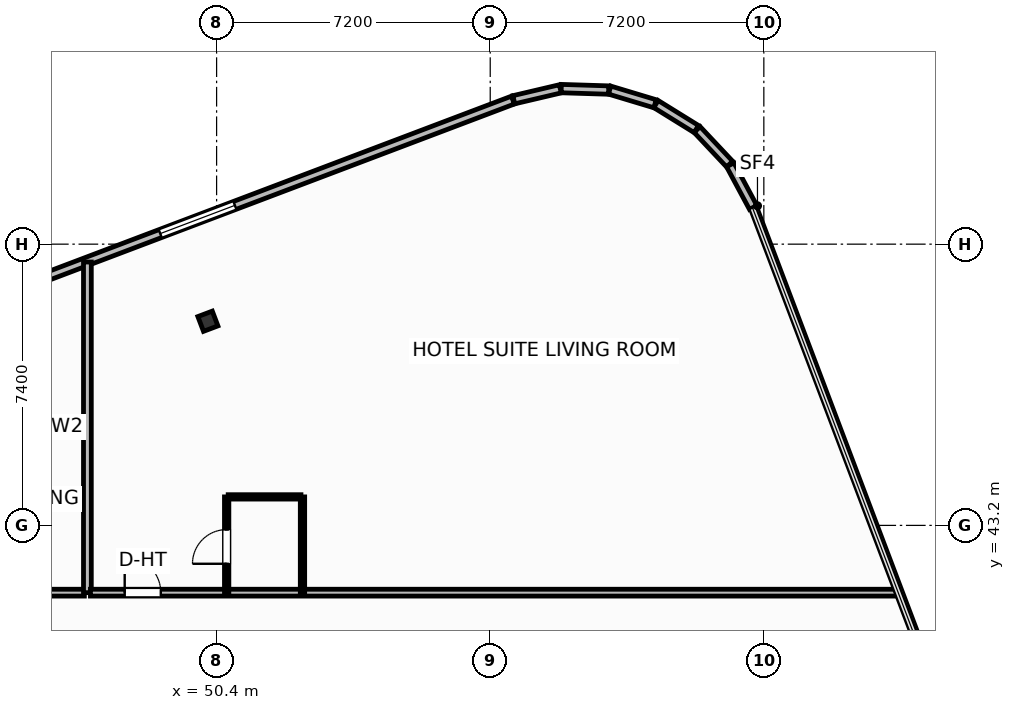
"""IFC4 building model, lengths in metres.
Left out: names, types, materials, properties, quantities, classifications, styles, units other than length and angle.
Written with IfcOpenShell. Run it as: python <this file> out.ifc"""

import sys

from ifc_helpers import new_model, si_unit, direction, frame, frame_2d, origin, origin_2d, place, context, subcontext, project, spatial, rectangle, i_section, extrude, element, fill, save


model = new_model("IFC4")
c1 = context("Model", 3, precision=1e-05, world=origin(), true_north=direction((0.0, 1.0)))
c2 = subcontext(c1, "Body", "Model", "MODEL_VIEW")
j1 = project(units=[si_unit("LENGTHUNIT", "METRE"), si_unit("PLANEANGLEUNIT", "RADIAN")], contexts=[c1])
p1 = place(None, origin())
s1 = spatial("IfcSite", under=j1, at=p1, CompositionType="ELEMENT")
p2 = place(p1, origin())
s2 = spatial("IfcBuilding", under=s1, at=p2, CompositionType="ELEMENT")
p3 = place(p2, frame((0.0, 0.0, 212.7)))
s3 = spatial("IfcBuildingStorey", under=s2, at=p3, CompositionType="ELEMENT", Elevation=212.7)
p4 = place(p3, frame((50.171, 48.572, 0.0), z_axis=(0.0, 0.0, 1.0), x_axis=(0.935221751401, 0.354062530786, 0.0)))
e1 = element("IfcColumn", 1, at=p4, inside=s3, PredefinedType="COLUMN", context=c2, shape_type="SweptSolid", body=[
    extrude(i_section(OverallWidth=0.406, OverallDepth=0.416, WebThickness=0.03, FlangeThickness=0.048, FilletRadius=0.025, at=origin_2d()), origin(), (0.0, 0.0, 1.0), 3.7),
])
p5 = place(p3, frame((64.519, 51.566, 0.0), z_axis=(0.0, 0.0, 1.0), x_axis=(-0.473093575122, 0.881012184466, 0.0)))
e2 = element("IfcWall", 2, at=p5, inside=s3, PredefinedType="SOLIDWALL", context=c2, shape_type="SweptSolid", body=[
    extrude(rectangle(XDim=1.274, YDim=0.22, at=frame_2d((0.637, 0.0))), origin(), (0.0, 0.0, 1.0), 2.73),
])
for number, where, z_axis, x_axis in (
    (3, (63.899, 52.706, 0.0), (0.0, 0.0, 1.0), (-0.685, 0.729, 0.0)),
    (4, (63.023, 53.629, 0.0), (0.0, 0.0, 1.0), (-0.85, 0.526, 0.0)),
):
    element("IfcWall", number, at=place(p3, frame(where, z_axis=z_axis, x_axis=x_axis)), inside=s3, PredefinedType="SOLIDWALL", context=c2, shape_type="SweptSolid", body=[
        extrude(rectangle(XDim=1.249, YDim=0.22, at=frame_2d((0.625, 0.0))), origin(), (0.0, 0.0, 1.0), 2.73),
    ])
for number, where, z_axis, x_axis in (
    (5, (61.937, 54.294, 0.0), (0.0, 0.0, 1.0), (-0.958, 0.288, 0.0)),
    (6, (60.717, 54.655, 0.0), (0.0, 0.0, 1.0), (-1.0, 0.031, 0.0)),
):
    element("IfcWall", number, at=place(p3, frame(where, z_axis=z_axis, x_axis=x_axis)), inside=s3, PredefinedType="SOLIDWALL", context=c2, shape_type="SweptSolid", body=[
        extrude(rectangle(XDim=1.249, YDim=0.22, at=frame_2d((0.624, 0.0))), origin(), (0.0, 0.0, 1.0), 2.73),
    ])
p6 = place(p3, frame((59.444, 54.688, 0.0), z_axis=(0.0, 0.0, 1.0), x_axis=(-0.973409523464, -0.229071821989, 0.0)))
e7 = element("IfcWall", 7, at=p6, inside=s3, PredefinedType="SOLIDWALL", context=c2, shape_type="SweptSolid", body=[
    extrude(rectangle(XDim=1.257, YDim=0.22, at=frame_2d((0.628, 0.0))), origin(), (0.0, 0.0, 1.0), 2.73),
])
p7 = place(p3, frame((58.198, 54.391, 0.0), z_axis=(0.0, 0.0, 1.0), x_axis=(-0.935223849772, -0.354056988094, 0.0)))
e8 = element("IfcWall", 8, at=p7, inside=s3, PredefinedType="SOLIDWALL", context=c2, shape_type="SweptSolid", body=[
    extrude(rectangle(XDim=17.747, YDim=0.22, at=frame_2d((8.874, 0.0))), origin(), (0.0, 0.0, 1.0), 2.73),
])
p8 = place(p7, frame((7.823, 0.0, 0.8)))
e9 = element("IfcOpeningElement", 9, at=p8, cuts=e8, PredefinedType="OPENING", context=c2, shape_type="SweptSolid", body=[
    extrude(rectangle(XDim=2.1, YDim=1.75, at=frame_2d((1.05, 0.875))), frame((0.0, 0.12, 0.0), z_axis=(0.0, -1.0, 0.0), x_axis=(1.0, 0.0, 0.0)), (0.0, 0.0, 1.0), 0.24),
])
p9 = place(p3, frame((35.58, 41.43, 0.0), z_axis=(0.0, 0.0, 1.0), x_axis=(1.0, 0.0, 0.0)))
e10 = element("IfcWall", 10, at=p9, inside=s3, PredefinedType="PARTITIONING", context=c2, shape_type="SweptSolid", body=[
    extrude(rectangle(XDim=11.34, YDim=0.18, at=frame_2d((5.67, 0.0))), origin(), (0.0, 0.0, 1.0), 3.018),
])
p10 = place(p9, frame((3.313, 0.0, 0.0)))
e11 = element("IfcOpeningElement", 11, at=p10, cuts=e10, PredefinedType="OPENING", context=c2, shape_type="SweptSolid", body=[
    extrude(rectangle(XDim=0.95, YDim=2.15, at=frame_2d((0.475, 1.075))), frame((0.0, 0.1, 0.0), z_axis=(0.0, -1.0, 0.0), x_axis=(1.0, 0.0, 0.0)), (0.0, 0.0, 1.0), 0.2),
])
p11 = place(p3, frame((47.0, 41.43, 0.0), z_axis=(0.0, 0.0, 1.0), x_axis=(0.0, 1.0, 0.0)))
e12 = element("IfcWall", 12, at=p11, inside=s3, PredefinedType="PARTITIONING", context=c2, shape_type="SweptSolid", body=[
    extrude(rectangle(XDim=8.7, YDim=0.205, at=frame_2d((4.35, 0.0))), origin(), (0.0, 0.0, 1.0), 3.45),
])
p12 = place(p3, frame((47.08, 41.43, 0.0), z_axis=(0.0, 0.0, 1.0), x_axis=(1.0, 0.0, 0.0)))
e13 = element("IfcWall", 13, at=p12, inside=s3, PredefinedType="PARTITIONING", context=c2, shape_type="SweptSolid", body=[
    extrude(rectangle(XDim=21.216, YDim=0.18, at=frame_2d((10.608, 0.0))), origin(), (0.0, 0.0, 1.0), 3.45),
])
p13 = place(p12, frame((0.902, 0.0, 0.0)))
e14 = element("IfcOpeningElement", 14, at=p13, cuts=e13, PredefinedType="OPENING", context=c2, shape_type="SweptSolid", body=[
    extrude(rectangle(XDim=0.95, YDim=2.15, at=frame_2d((0.475, 1.075))), frame((0.0, 0.1, 0.0), z_axis=(0.0, -1.0, 0.0), x_axis=(1.0, 0.0, 0.0)), (0.0, 0.0, 1.0), 0.2),
])
p14 = place(p3, frame((50.705, 43.95, 0.0), z_axis=(0.0, 0.0, 1.0), x_axis=(1.0, 0.0, 0.0)))
e15 = element("IfcWall", 15, at=p14, inside=s3, PredefinedType="PARTITIONING", context=c2, shape_type="SweptSolid", body=[
    extrude(rectangle(XDim=1.915, YDim=0.115, at=frame_2d((0.958, 0.0))), origin(), (0.0, 0.0, 1.0), 3.45),
])
p15 = place(p3, frame((50.665, 41.43, 0.0), z_axis=(0.0, 0.0, 1.0), x_axis=(0.0, 1.0, 0.0)))
e16 = element("IfcWall", 16, at=p15, inside=s3, PredefinedType="PARTITIONING", context=c2, shape_type="SweptSolid", body=[
    extrude(rectangle(XDim=2.52, YDim=0.115, at=frame_2d((1.26, 0.0))), origin(), (0.0, 0.0, 1.0), 3.45),
])
p16 = place(p15, frame((0.76, 0.0, 0.0)))
e17 = element("IfcOpeningElement", 17, at=p16, cuts=e16, PredefinedType="OPENING", context=c2, shape_type="SweptSolid", body=[
    extrude(rectangle(XDim=0.9, YDim=2.05, at=frame_2d((0.45, 1.025))), frame((0.0, 0.067, 0.0), z_axis=(0.0, -1.0, 0.0), x_axis=(1.0, 0.0, 0.0)), (0.0, 0.0, 1.0), 0.135),
])
p17 = place(p3, frame((52.66, 41.43, 0.0), z_axis=(0.0, 0.0, 1.0), x_axis=(0.0, 1.0, 0.0)))
e18 = element("IfcWall", 18, at=p17, inside=s3, PredefinedType="PARTITIONING", context=c2, shape_type="SweptSolid", body=[
    extrude(rectangle(XDim=2.52, YDim=0.115, at=frame_2d((1.26, 0.0))), origin(), (0.0, 0.0, 1.0), 3.45),
])
p18 = place(p8, origin())
e19 = element("IfcWindow", 19, at=p18, inside=s3, PartitioningType="SINGLE_PANEL", PredefinedType="WINDOW", context=c2, shape_type="SweptSolid", body=[
    extrude(rectangle(XDim=2.1, YDim=1.75, at=frame_2d((1.05, 0.875))), frame((0.0, 0.03, 0.0), z_axis=(0.0, -1.0, 0.0), x_axis=(1.0, 0.0, 0.0)), (0.0, 0.0, 1.0), 0.06),
])
fill(e9, e19)
p19 = place(p13, origin())
e20 = element("IfcDoor", 20, at=p19, inside=s3, OperationType="SINGLE_SWING_LEFT", PredefinedType="DOOR", context=c2, shape_type="SweptSolid", body=[
    extrude(rectangle(XDim=0.95, YDim=2.15, at=frame_2d((0.475, 1.075))), frame((0.0, 0.025, 0.0), z_axis=(0.0, -1.0, 0.0), x_axis=(1.0, 0.0, 0.0)), (0.0, 0.0, 1.0), 0.05),
])
fill(e14, e20)
p20 = place(p16, origin())
e21 = element("IfcDoor", 21, at=p20, inside=s3, OperationType="SINGLE_SWING_LEFT", PredefinedType="DOOR", context=c2, shape_type="SweptSolid", body=[
    extrude(rectangle(XDim=0.9, YDim=2.05, at=frame_2d((0.45, 1.025))), frame((0.0, 0.025, 0.0), z_axis=(0.0, -1.0, 0.0), x_axis=(1.0, 0.0, 0.0)), (0.0, 0.0, 1.0), 0.05),
])
fill(e17, e21)
save(model, sys.argv[1])
